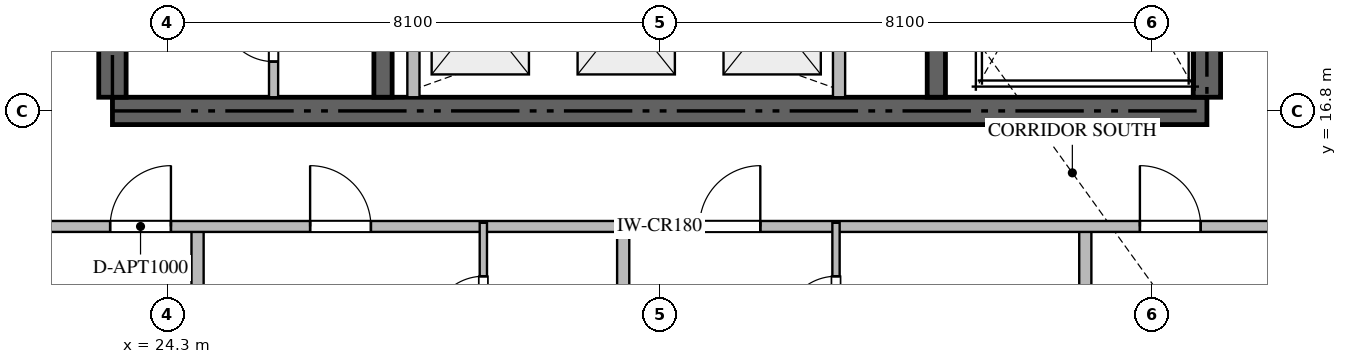
"""IFC4 building model, lengths in metres.
Left out: names, types, materials, properties, quantities, classifications, styles, units other than length and angle.
Written with IfcOpenShell. Run it as: python <this file> out.ifc"""

import sys

from ifc_helpers import new_model, si_unit, direction, frame, frame_2d, origin, place, context, subcontext, project, spatial, rectangle, extrude, source, transform, mapped, element, fill, save


model = new_model("IFC4")
c1 = context("Model", 3, precision=1e-05, world=origin(), true_north=direction((0.0, 1.0)))
c2 = subcontext(c1, "Body", "Model", "MODEL_VIEW")
j1 = project(units=[si_unit("LENGTHUNIT", "METRE"), si_unit("PLANEANGLEUNIT", "RADIAN")], contexts=[c1])
p1 = place(None, origin())
s1 = spatial("IfcSite", under=j1, at=p1, CompositionType="ELEMENT")
p2 = place(p1, origin())
s2 = spatial("IfcBuilding", under=s1, at=p2, CompositionType="ELEMENT")
p3 = place(p2, frame((0.0, 0.0, 67.95)))
s3 = spatial("IfcBuildingStorey", under=s2, at=p3, CompositionType="ELEMENT", Elevation=67.95)
p4 = place(p3, frame((23.4, 16.8, -0.26), z_axis=(0.0, 0.0, 1.0), x_axis=(1.0, 0.0, 0.0)))
e1 = element("IfcWall", 1, at=p4, inside=s3, PredefinedType="SHEAR", context=c2, shape_type="SweptSolid", body=[
    extrude(rectangle(XDim=18.0, YDim=0.45, at=frame_2d((9.0, 0.0))), origin(), (0.0, 0.0, 1.0), 3.748),
])
p5 = place(p3, frame((23.4, 17.025, -0.26), z_axis=(0.0, 0.0, 1.0), x_axis=(0.0, 1.0, 0.0)))
e2 = element("IfcWall", 2, at=p5, inside=s3, PredefinedType="SHEAR", context=c2, shape_type="SweptSolid", body=[
    extrude(rectangle(XDim=4.825, YDim=0.45, at=frame_2d((2.413, 0.0))), origin(), (0.0, 0.0, 1.0), 3.748),
])
p6 = place(p3, frame((41.4, 17.025, -0.26), z_axis=(0.0, 0.0, 1.0), x_axis=(0.0, 1.0, 0.0)))
e3 = element("IfcWall", 3, at=p6, inside=s3, PredefinedType="SHEAR", context=c2, shape_type="SweptSolid", body=[
    extrude(rectangle(XDim=8.325, YDim=0.45, at=frame_2d((4.163, 0.0))), origin(), (0.0, 0.0, 1.0), 3.748),
])
p7 = place(p3, frame((27.85, 17.025, -0.26), z_axis=(0.0, 0.0, 1.0), x_axis=(0.0, 1.0, 0.0)))
e4 = element("IfcWall", 4, at=p7, inside=s3, PredefinedType="SHEAR", context=c2, shape_type="SweptSolid", body=[
    extrude(rectangle(XDim=4.825, YDim=0.3, at=frame_2d((2.413, 0.0))), origin(), (0.0, 0.0, 1.0), 3.748),
])
p8 = place(p3, frame((36.95, 17.025, -0.26), z_axis=(0.0, 0.0, 1.0), x_axis=(0.0, 1.0, 0.0)))
e5 = element("IfcWall", 5, at=p8, inside=s3, PredefinedType="SHEAR", context=c2, shape_type="SweptSolid", body=[
    extrude(rectangle(XDim=8.325, YDim=0.3, at=frame_2d((4.163, 0.0))), origin(), (0.0, 0.0, 1.0), 3.748),
])
for number, where, z_axis, x_axis in (
    (6, (28.35, 17.025, 0.0), (0.0, 0.0, 1.0), (0.0, 1.0, 0.0)),
    (7, (35.35, 17.025, 0.0), (0.0, 0.0, 1.0), (0.0, 1.0, 0.0)),
):
    element("IfcWall", number, at=place(p3, frame(where, z_axis=z_axis, x_axis=x_axis)), inside=s3, PredefinedType="STANDARD", context=c2, shape_type="SweptSolid", body=[
        extrude(rectangle(XDim=2.525, YDim=0.2, at=frame_2d((1.263, 0.0))), origin(), (0.0, 0.0, 1.0), 3.49),
    ])
p9 = place(p3, frame((26.05, 17.025, 0.0), z_axis=(0.0, 0.0, 1.0), x_axis=(0.0, 1.0, 0.0)))
e8 = element("IfcWall", 8, at=p9, inside=s3, PredefinedType="PARTITIONING", context=c2, shape_type="SweptSolid", body=[
    extrude(rectangle(XDim=2.023, YDim=0.15, at=frame_2d((1.012, 0.0))), origin(), (0.0, 0.0, 1.0), 3.49),
])
p10 = place(p9, frame((0.586, 0.0, 0.0)))
e9 = element("IfcOpeningElement", 9, at=p10, cuts=e8, PredefinedType="OPENING", context=c2, shape_type="SweptSolid", body=[
    extrude(rectangle(XDim=0.85, YDim=2.1, at=frame_2d((0.425, 1.05))), frame((0.0, 0.085, 0.0), z_axis=(0.0, -1.0, 0.0), x_axis=(1.0, 0.0, 0.0)), (0.0, 0.0, 1.0), 0.17),
])
for number, where, z_axis, x_axis in (
    (10, (24.8, 0.282, 0.0), (0.0, 0.0, 1.0), (0.0, 1.0, 0.0)),
    (11, (31.8, 0.282, 0.0), (0.0, 0.0, 1.0), (0.0, 1.0, 0.0)),
    (12, (39.4, 0.282, 0.0), (0.0, 0.0, 1.0), (0.0, 1.0, 0.0)),
):
    element("IfcWall", number, at=place(p3, frame(where, z_axis=z_axis, x_axis=x_axis)), inside=s3, PredefinedType="PARTITIONING", context=c2, shape_type="SweptSolid", body=[
        extrude(rectangle(XDim=14.618, YDim=0.2, at=frame_2d((7.309, 0.0))), origin(), (0.0, 0.0, 1.0), 3.49),
    ])
p11 = place(p3, frame((21.402, 14.9, 0.0), z_axis=(0.0, 0.0, 1.0), x_axis=(1.0, 0.0, 0.0)))
e13 = element("IfcWall", 13, at=p11, inside=s3, PredefinedType="PARTITIONING", context=c2, shape_type="SweptSolid", body=[
    extrude(rectangle(XDim=21.996, YDim=0.18, at=frame_2d((10.998, 0.0))), origin(), (0.0, 0.0, 1.0), 3.49),
])
p12 = place(p11, frame((1.96, 0.0, 0.0)))
e14 = element("IfcOpeningElement", 14, at=p12, cuts=e13, PredefinedType="OPENING", context=c2, shape_type="SweptSolid", body=[
    extrude(rectangle(XDim=1.0, YDim=2.15, at=frame_2d((0.5, 1.075))), frame((0.0, 0.1, 0.0), z_axis=(0.0, -1.0, 0.0), x_axis=(1.0, 0.0, 0.0)), (0.0, 0.0, 1.0), 0.2),
])
p13 = place(p11, frame((5.249, 0.0, 0.0)))
e15 = element("IfcOpeningElement", 15, at=p13, cuts=e13, PredefinedType="OPENING", context=c2, shape_type="SweptSolid", body=[
    extrude(rectangle(XDim=1.0, YDim=2.15, at=frame_2d((0.5, 1.075))), frame((0.0, 0.1, 0.0), z_axis=(0.0, -1.0, 0.0), x_axis=(1.0, 0.0, 0.0)), (0.0, 0.0, 1.0), 0.2),
])
p14 = place(p11, frame((11.653, 0.0, 0.0)))
e16 = element("IfcOpeningElement", 16, at=p14, cuts=e13, PredefinedType="OPENING", context=c2, shape_type="SweptSolid", body=[
    extrude(rectangle(XDim=1.0, YDim=2.15, at=frame_2d((0.5, 1.075))), frame((0.0, 0.1, 0.0), z_axis=(0.0, -1.0, 0.0), x_axis=(1.0, 0.0, 0.0)), (0.0, 0.0, 1.0), 0.2),
])
p15 = place(p11, frame((18.896, 0.0, 0.0)))
e17 = element("IfcOpeningElement", 17, at=p15, cuts=e13, PredefinedType="OPENING", context=c2, shape_type="SweptSolid", body=[
    extrude(rectangle(XDim=1.0, YDim=2.15, at=frame_2d((0.5, 1.075))), frame((0.0, 0.1, 0.0), z_axis=(0.0, -1.0, 0.0), x_axis=(1.0, 0.0, 0.0)), (0.0, 0.0, 1.0), 0.2),
])
p16 = place(p3, frame((29.5, 12.352, 0.0), z_axis=(0.0, 0.0, 1.0), x_axis=(0.0, 1.0, 0.0)))
e18 = element("IfcWall", 18, at=p16, inside=s3, PredefinedType="PARTITIONING", context=c2, shape_type="SweptSolid", body=[
    extrude(rectangle(XDim=2.608, YDim=0.12, at=frame_2d((1.304, 0.0))), origin(), (0.0, 0.0, 1.0), 3.49),
])
p17 = place(p16, frame((0.879, 0.0, 0.0)))
e19 = element("IfcOpeningElement", 19, at=p17, cuts=e18, PredefinedType="OPENING", context=c2, shape_type="SweptSolid", body=[
    extrude(rectangle(XDim=0.85, YDim=2.1, at=frame_2d((0.425, 1.05))), frame((0.0, 0.07, 0.0), z_axis=(0.0, -1.0, 0.0), x_axis=(1.0, 0.0, 0.0)), (0.0, 0.0, 1.0), 0.14),
])
p18 = place(p3, frame((35.3, 12.352, 0.0), z_axis=(0.0, 0.0, 1.0), x_axis=(0.0, 1.0, 0.0)))
e20 = element("IfcWall", 20, at=p18, inside=s3, PredefinedType="PARTITIONING", context=c2, shape_type="SweptSolid", body=[
    extrude(rectangle(XDim=2.608, YDim=0.12, at=frame_2d((1.304, 0.0))), origin(), (0.0, 0.0, 1.0), 3.49),
])
p19 = place(p18, frame((0.879, 0.0, 0.0)))
e21 = element("IfcOpeningElement", 21, at=p19, cuts=e20, PredefinedType="OPENING", context=c2, shape_type="SweptSolid", body=[
    extrude(rectangle(XDim=0.85, YDim=2.1, at=frame_2d((0.425, 1.05))), frame((0.0, 0.07, 0.0), z_axis=(0.0, -1.0, 0.0), x_axis=(1.0, 0.0, 0.0)), (0.0, 0.0, 1.0), 0.14),
])
m1 = source(origin(), c2, "Body", "SweptSolid", [
    extrude(rectangle(XDim=0.85, YDim=2.1, at=frame_2d((0.425, 1.05))), frame((0.0, 0.025, 0.0), z_axis=(0.0, -1.0, 0.0), x_axis=(1.0, 0.0, 0.0)), (0.0, 0.0, 1.0), 0.05),
])
p20 = place(p10, origin())
e22 = element("IfcDoor", 22, at=p20, inside=s3, OperationType="SINGLE_SWING_RIGHT", PredefinedType="DOOR", context=c2, shape_type="MappedRepresentation", body=[
    mapped(m1, transform((0.0, 0.0, 0.0), scale=1.0)),
])
fill(e9, e22)
m2 = source(origin(), c2, "Body", "SweptSolid", [
    extrude(rectangle(XDim=1.0, YDim=2.15, at=frame_2d((0.5, 1.075))), frame((0.0, 0.025, 0.0), z_axis=(0.0, -1.0, 0.0), x_axis=(1.0, 0.0, 0.0)), (0.0, 0.0, 1.0), 0.05),
])
p21 = place(p12, origin())
e23 = element("IfcDoor", 23, at=p21, inside=s3, OperationType="SINGLE_SWING_RIGHT", PredefinedType="DOOR", context=c2, shape_type="MappedRepresentation", body=[
    mapped(m2, transform((0.0, 0.0, 0.0), scale=1.0)),
])
fill(e14, e23)
p22 = place(p13, origin())
e24 = element("IfcDoor", 24, at=p22, inside=s3, OperationType="SINGLE_SWING_LEFT", PredefinedType="DOOR", context=c2, shape_type="MappedRepresentation", body=[
    mapped(m2, transform((0.0, 0.0, 0.0), scale=1.0)),
])
fill(e15, e24)
p23 = place(p14, origin())
e25 = element("IfcDoor", 25, at=p23, inside=s3, OperationType="SINGLE_SWING_RIGHT", PredefinedType="DOOR", context=c2, shape_type="MappedRepresentation", body=[
    mapped(m2, transform((0.0, 0.0, 0.0), scale=1.0)),
])
fill(e16, e25)
p24 = place(p15, origin())
e26 = element("IfcDoor", 26, at=p24, inside=s3, OperationType="SINGLE_SWING_LEFT", PredefinedType="DOOR", context=c2, shape_type="MappedRepresentation", body=[
    mapped(m2, transform((0.0, 0.0, 0.0), scale=1.0)),
])
fill(e17, e26)
p25 = place(p17, origin())
e27 = element("IfcDoor", 27, at=p25, inside=s3, OperationType="SINGLE_SWING_LEFT", PredefinedType="DOOR", context=c2, shape_type="MappedRepresentation", body=[
    mapped(m1, transform((0.0, 0.0, 0.0), scale=1.0)),
])
fill(e19, e27)
p26 = place(p19, origin())
e28 = element("IfcDoor", 28, at=p26, inside=s3, OperationType="SINGLE_SWING_LEFT", PredefinedType="DOOR", context=c2, shape_type="MappedRepresentation", body=[
    mapped(m1, transform((0.0, 0.0, 0.0), scale=1.0)),
])
fill(e21, e28)
save(model, sys.argv[1])
